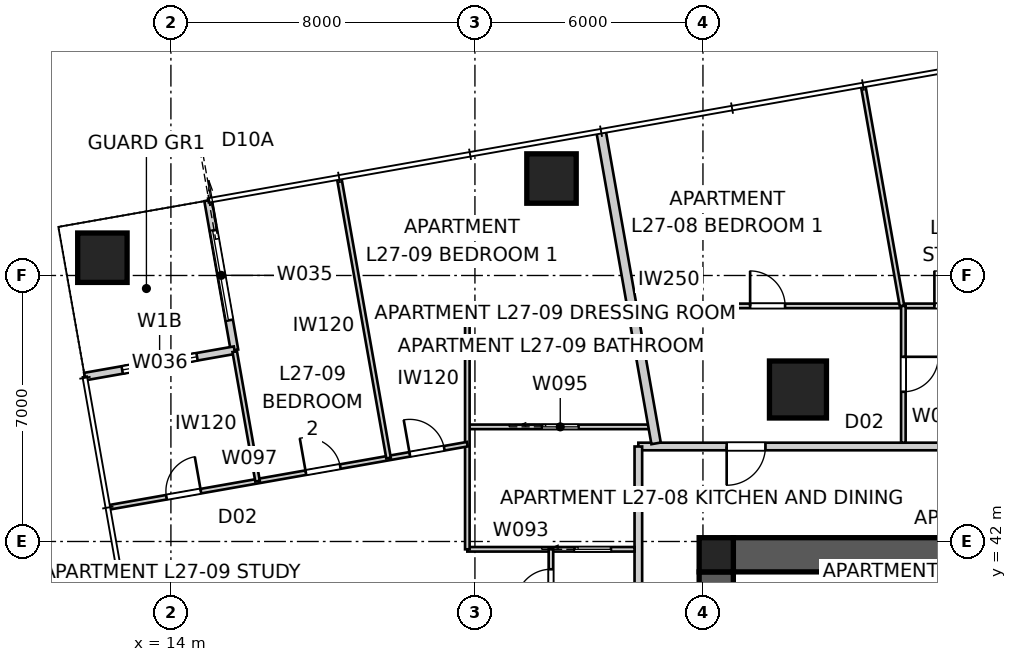
"""IFC4 building model, lengths in metres.
Left out: names, types, materials, properties, quantities, classifications, styles, units other than length and angle.
Written with IfcOpenShell. Run it as: python <this file> out.ifc"""

import sys

from ifc_helpers import new_model, si_unit, direction, frame, frame_2d, origin, origin_2d, place, context, subcontext, project, spatial, polyline, rectangle, outline, extrude, element, fill, save


model = new_model("IFC4")
c1 = context("Model", 3, precision=1e-05, world=origin(), true_north=direction((0.0, 1.0)))
c2 = subcontext(c1, "Body", "Model", "MODEL_VIEW")
j1 = project(units=[si_unit("LENGTHUNIT", "METRE"), si_unit("PLANEANGLEUNIT", "RADIAN")], contexts=[c1])
p1 = place(None, origin())
s1 = spatial("IfcSite", under=j1, at=p1, CompositionType="ELEMENT")
p2 = place(p1, origin())
s2 = spatial("IfcBuilding", under=s1, at=p2, CompositionType="ELEMENT")
p3 = place(p2, frame((0.0, 0.0, 99.8)))
s3 = spatial("IfcBuildingStorey", under=s2, at=p3, CompositionType="ELEMENT", Elevation=99.8)
p4 = place(p3, frame((28.8, 41.65, 0.0), z_axis=(0.0, 0.0, 1.0), x_axis=(1.0, 0.0, 0.0)))
e1 = element("IfcWall", 1, at=p4, inside=s3, PredefinedType="SHEAR", context=c2, shape_type="SweptSolid", body=[
    extrude(outline(polyline([(0.0, -0.45), (22.4, -0.45), (22.4, -0.025), (22.85, -0.025), (22.85, 0.025), (22.4, 0.025), (22.4, 0.45), (0.0, 0.45), (0.0, 0.025), (-0.45, 0.025), (-0.45, -0.025), (0.0, -0.025), (0.0, -0.45)])), origin(), (0.0, 0.0, 1.0), 3.4),
])
p5 = place(p3, frame((28.35, 41.2, 0.0), z_axis=(0.0, 0.0, 1.0), x_axis=(0.0, -1.0, 0.0)))
e2 = element("IfcWall", 2, at=p5, inside=s3, PredefinedType="SHEAR", context=c2, shape_type="SweptSolid", body=[
    extrude(outline(polyline([(0.0, -0.45), (22.4, -0.45), (22.4, -0.025), (22.85, -0.025), (22.85, 0.025), (22.4, 0.025), (22.4, 0.45), (0.0, 0.45), (0.0, 0.025), (-0.45, 0.025), (-0.45, -0.025), (0.0, -0.025), (0.0, -0.45)])), origin(), (0.0, 0.0, 1.0), 3.4),
])
p6 = place(p5, frame((11.14, 0.0, 0.0)))
e3 = element("IfcOpeningElement", 3, at=p6, cuts=e2, PredefinedType="OPENING", context=c2, shape_type="SweptSolid", body=[
    extrude(rectangle(XDim=1.02, YDim=2.4, at=frame_2d((0.51, 1.2))), frame((0.0, 0.46, 0.0), z_axis=(0.0, -1.0, 0.0), x_axis=(1.0, 0.0, 0.0)), (0.0, 0.0, 1.0), 0.92),
])
p7 = place(p3, frame((28.35, 41.65, 0.0), z_axis=(0.0, 0.0, 1.0), x_axis=(1.0, 0.0, 0.0)))
e4 = element("IfcColumn", 4, at=p7, inside=s3, PredefinedType="COLUMN", context=c2, shape_type="SweptSolid", body=[
    extrude(rectangle(XDim=0.9, YDim=0.9, at=origin_2d()), origin(), (0.0, 0.0, 1.0), 3.4),
])
for number, where, z_axis, x_axis in (
    (5, (24.015, 51.552, 0.0), (0.0, 0.0, 1.0), (1.0, 0.0, 0.0)),
    (6, (12.197, 49.468, 0.0), (0.0, 0.0, 1.0), (1.0, 0.0, 0.0)),
):
    element("IfcColumn", number, at=place(p3, frame(where, z_axis=z_axis, x_axis=x_axis)), inside=s3, PredefinedType="COLUMN", context=c2, shape_type="SweptSolid", body=[
        extrude(rectangle(XDim=1.3, YDim=1.3, at=origin_2d()), origin(), (0.0, 0.0, 1.0), 3.4),
    ])
p8 = place(p3, frame((30.5, 46.0, 0.0), z_axis=(0.0, 0.0, 1.0), x_axis=(1.0, 0.0, 0.0)))
e7 = element("IfcColumn", 7, at=p8, inside=s3, PredefinedType="COLUMN", context=c2, shape_type="SweptSolid", body=[
    extrude(rectangle(XDim=1.5, YDim=1.5, at=origin_2d()), origin(), (0.0, 0.0, 1.0), 3.4),
])
p9 = place(p3, frame((14.978, 50.974, 0.0), z_axis=(0.0, 0.0, 1.0), x_axis=(0.173646056486, -0.984808127031, 0.0)))
e8 = element("IfcWall", 8, at=p9, inside=s3, PredefinedType="SOLIDWALL", context=c2, shape_type="SweptSolid", body=[
    extrude(rectangle(XDim=4.0, YDim=0.2, at=frame_2d((2.0, 0.0))), origin(), (0.0, 0.0, 1.0), 3.25),
])
p10 = place(p9, frame((0.8, 0.0, 0.0)))
e9 = element("IfcOpeningElement", 9, at=p10, cuts=e8, PredefinedType="OPENING", context=c2, shape_type="SweptSolid", body=[
    extrude(rectangle(XDim=2.4, YDim=2.1, at=frame_2d((1.2, 1.05))), frame((0.0, 0.11, 0.0), z_axis=(0.0, -1.0, 0.0), x_axis=(1.0, 0.0, 0.0)), (0.0, 0.0, 1.0), 0.22),
])
p11 = place(p3, frame((15.672, 47.034, 0.0), z_axis=(0.0, 0.0, 1.0), x_axis=(-0.984808127031, -0.173646056486, 0.0)))
e10 = element("IfcWall", 10, at=p11, inside=s3, PredefinedType="SOLIDWALL", context=c2, shape_type="SweptSolid", body=[
    extrude(rectangle(XDim=4.0, YDim=0.2, at=frame_2d((2.0, 0.0))), origin(), (0.0, 0.0, 1.0), 3.25),
])
p12 = place(p11, frame((1.0, 0.0, 0.45)))
e11 = element("IfcOpeningElement", 11, at=p12, cuts=e10, PredefinedType="OPENING", context=c2, shape_type="SweptSolid", body=[
    extrude(rectangle(XDim=2.0, YDim=1.8, at=frame_2d((1.0, 0.9))), frame((0.0, 0.11, 0.0), z_axis=(0.0, -1.0, 0.0), x_axis=(1.0, 0.0, 0.0)), (0.0, 0.0, 1.0), 0.22),
])
p13 = place(p3, frame((53.7, 44.5, 0.0), z_axis=(0.0, 0.0, 1.0), x_axis=(-1.0, 0.0, 0.0)))
e12 = element("IfcWall", 12, at=p13, inside=s3, PredefinedType="PARTITIONING", context=c2, shape_type="SweptSolid", body=[
    extrude(rectangle(XDim=27.4, YDim=0.2, at=frame_2d((13.7, 0.0))), origin(), (0.0, 0.0, 1.0), 3.25),
])
p14 = place(p13, frame((24.056, 0.0, 0.0)))
e13 = element("IfcOpeningElement", 13, at=p14, cuts=e12, PredefinedType="OPENING", context=c2, shape_type="SweptSolid", body=[
    extrude(rectangle(XDim=1.02, YDim=2.1, at=frame_2d((0.51, 1.05))), frame((0.0, 0.11, 0.0), z_axis=(0.0, -1.0, 0.0), x_axis=(1.0, 0.0, 0.0)), (0.0, 0.0, 1.0), 0.22),
])
p15 = place(p13, frame((2.305, 0.0, 0.0)))
e14 = element("IfcOpeningElement", 14, at=p15, cuts=e12, PredefinedType="OPENING", context=c2, shape_type="SweptSolid", body=[
    extrude(rectangle(XDim=1.02, YDim=2.1, at=frame_2d((0.51, 1.05))), frame((0.0, 0.11, 0.0), z_axis=(0.0, -1.0, 0.0), x_axis=(1.0, 0.0, 0.0)), (0.0, 0.0, 1.0), 0.22),
])
p16 = place(p3, frame((26.3, 44.5, 0.0), z_axis=(0.0, 0.0, 1.0), x_axis=(0.0, -1.0, 0.0)))
e15 = element("IfcWall", 15, at=p16, inside=s3, PredefinedType="PARTITIONING", context=c2, shape_type="SweptSolid", body=[
    extrude(rectangle(XDim=29.0, YDim=0.2, at=frame_2d((14.5, 0.0))), origin(), (0.0, 0.0, 1.0), 3.25),
])
p17 = place(p16, frame((14.257, 0.0, 0.0)))
e16 = element("IfcOpeningElement", 16, at=p17, cuts=e15, PredefinedType="OPENING", context=c2, shape_type="SweptSolid", body=[
    extrude(rectangle(XDim=1.02, YDim=2.34, at=frame_2d((0.51, 1.17))), frame((0.0, 0.11, 0.0), z_axis=(0.0, -1.0, 0.0), x_axis=(1.0, 0.0, 0.0)), (0.0, 0.0, 1.0), 0.22),
])
p18 = place(p16, frame((18.322, 0.0, 0.0)))
e17 = element("IfcOpeningElement", 17, at=p18, cuts=e15, PredefinedType="OPENING", context=c2, shape_type="SweptSolid", body=[
    extrude(rectangle(XDim=1.02, YDim=2.34, at=frame_2d((0.51, 1.17))), frame((0.0, 0.11, 0.0), z_axis=(0.0, -1.0, 0.0), x_axis=(1.0, 0.0, 0.0)), (0.0, 0.0, 1.0), 0.22),
])
p19 = place(p16, frame((3.963, 0.0, 0.0)))
e18 = element("IfcOpeningElement", 18, at=p19, cuts=e15, PredefinedType="OPENING", context=c2, shape_type="SweptSolid", body=[
    extrude(rectangle(XDim=1.02, YDim=2.34, at=frame_2d((0.51, 1.17))), frame((0.0, 0.11, 0.0), z_axis=(0.0, -1.0, 0.0), x_axis=(1.0, 0.0, 0.0)), (0.0, 0.0, 1.0), 0.22),
])
p20 = place(p3, frame((25.318, 52.797, 0.0), z_axis=(0.0, 0.0, 1.0), x_axis=(0.173651756605, -0.984807121942, 0.0)))
e19 = element("IfcWall", 19, at=p20, inside=s3, PredefinedType="PARTITIONING", context=c2, shape_type="SweptSolid", body=[
    extrude(rectangle(XDim=8.341, YDim=0.25, at=frame_2d((4.171, 0.0))), origin(), (0.0, 0.0, 1.0), 3.25),
])
p21 = place(p3, frame((21.8, 48.2, 0.0), z_axis=(0.0, 0.0, 1.0), x_axis=(1.0, 0.0, 0.0)))
e20 = element("IfcWall", 20, at=p21, inside=s3, PredefinedType="PARTITIONING", context=c2, shape_type="SweptSolid", body=[
    extrude(rectangle(XDim=36.4, YDim=0.12, at=frame_2d((18.2, 0.0))), origin(), (0.0, 0.0, 1.0), 3.25),
])
p22 = place(p21, frame((7.441, 0.0, 0.0)))
e21 = element("IfcOpeningElement", 21, at=p22, cuts=e20, PredefinedType="OPENING", context=c2, shape_type="SweptSolid", body=[
    extrude(rectangle(XDim=0.92, YDim=2.34, at=frame_2d((0.46, 1.17))), frame((0.0, 0.07, 0.0), z_axis=(0.0, -1.0, 0.0), x_axis=(1.0, 0.0, 0.0)), (0.0, 0.0, 1.0), 0.14),
])
p23 = place(p21, frame((28.144, 0.0, 0.0)))
e22 = element("IfcOpeningElement", 22, at=p23, cuts=e20, PredefinedType="OPENING", context=c2, shape_type="SweptSolid", body=[
    extrude(rectangle(XDim=0.92, YDim=2.34, at=frame_2d((0.46, 1.17))), frame((0.0, 0.07, 0.0), z_axis=(0.0, -1.0, 0.0), x_axis=(1.0, 0.0, 0.0)), (0.0, 0.0, 1.0), 0.14),
])
p24 = place(p21, frame((12.29, 0.0, 0.0)))
e23 = element("IfcOpeningElement", 23, at=p24, cuts=e20, PredefinedType="OPENING", context=c2, shape_type="SweptSolid", body=[
    extrude(rectangle(XDim=0.92, YDim=2.34, at=frame_2d((0.46, 1.17))), frame((0.0, 0.07, 0.0), z_axis=(0.0, -1.0, 0.0), x_axis=(1.0, 0.0, 0.0)), (0.0, 0.0, 1.0), 0.14),
])
p25 = place(p21, frame((15.505, 0.0, 0.0)))
e24 = element("IfcOpeningElement", 24, at=p25, cuts=e20, PredefinedType="OPENING", context=c2, shape_type="SweptSolid", body=[
    extrude(rectangle(XDim=0.96, YDim=2.1, at=frame_2d((0.48, 1.05))), frame((0.0, 0.07, 0.0), z_axis=(0.0, -1.0, 0.0), x_axis=(1.0, 0.0, 0.0)), (0.0, 0.0, 1.0), 0.14),
])
p26 = place(p21, frame((18.991, 0.0, 0.0)))
e25 = element("IfcOpeningElement", 25, at=p26, cuts=e20, PredefinedType="OPENING", context=c2, shape_type="SweptSolid", body=[
    extrude(rectangle(XDim=0.96, YDim=2.1, at=frame_2d((0.48, 1.05))), frame((0.0, 0.07, 0.0), z_axis=(0.0, -1.0, 0.0), x_axis=(1.0, 0.0, 0.0)), (0.0, 0.0, 1.0), 0.14),
])
p27 = place(p3, frame((33.273, 48.2, 0.0), z_axis=(0.0, 0.0, 1.0), x_axis=(0.0, -1.0, 0.0)))
e26 = element("IfcWall", 26, at=p27, inside=s3, PredefinedType="PARTITIONING", context=c2, shape_type="SweptSolid", body=[
    extrude(rectangle(XDim=3.6, YDim=0.12, at=frame_2d((1.8, 0.0))), origin(), (0.0, 0.0, 1.0), 3.25),
])
p28 = place(p27, frame((1.34, 0.0, 0.0)))
e27 = element("IfcOpeningElement", 27, at=p28, cuts=e26, PredefinedType="OPENING", context=c2, shape_type="SweptSolid", body=[
    extrude(rectangle(XDim=0.92, YDim=2.34, at=frame_2d((0.46, 1.17))), frame((0.0, 0.07, 0.0), z_axis=(0.0, -1.0, 0.0), x_axis=(1.0, 0.0, 0.0)), (0.0, 0.0, 1.0), 0.14),
])
p29 = place(p3, frame((32.219, 53.973, 0.0), z_axis=(0.0, 0.0, 1.0), x_axis=(0.173623777139, -0.984812055172, 0.0)))
e28 = element("IfcWall", 28, at=p29, inside=s3, PredefinedType="PARTITIONING", context=c2, shape_type="SweptSolid", body=[
    extrude(rectangle(XDim=5.862, YDim=0.12, at=frame_2d((2.931, 0.0))), origin(), (0.0, 0.0, 1.0), 3.25),
])
p30 = place(p3, frame((21.8, 41.795, 0.0), z_axis=(0.0, 0.0, 1.0), x_axis=(1.0, 0.0, 0.0)))
e29 = element("IfcWall", 29, at=p30, inside=s3, PredefinedType="PARTITIONING", context=c2, shape_type="SweptSolid", body=[
    extrude(rectangle(XDim=4.4, YDim=0.12, at=frame_2d((2.2, 0.0))), origin(), (0.0, 0.0, 1.0), 3.25),
])
p31 = place(p30, frame((2.82, 0.0, 0.0)))
e30 = element("IfcOpeningElement", 30, at=p31, cuts=e29, PredefinedType="OPENING", context=c2, shape_type="SweptSolid", body=[
    extrude(rectangle(XDim=0.96, YDim=2.1, at=frame_2d((0.48, 1.05))), frame((0.0, 0.07, 0.0), z_axis=(0.0, -1.0, 0.0), x_axis=(1.0, 0.0, 0.0)), (0.0, 0.0, 1.0), 0.14),
])
p32 = place(p3, frame((24.0, 37.948, 0.0), z_axis=(0.0, 0.0, 1.0), x_axis=(0.0, 1.0, 0.0)))
e31 = element("IfcWall", 31, at=p32, inside=s3, PredefinedType="PARTITIONING", context=c2, shape_type="SweptSolid", body=[
    extrude(rectangle(XDim=3.847, YDim=0.12, at=frame_2d((1.923, 0.0))), origin(), (0.0, 0.0, 1.0), 2.55),
])
p33 = place(p32, frame((2.402, 0.0, 0.0)))
e32 = element("IfcOpeningElement", 32, at=p33, cuts=e31, PredefinedType="OPENING", context=c2, shape_type="SweptSolid", body=[
    extrude(rectangle(XDim=0.92, YDim=2.34, at=frame_2d((0.46, 1.17))), frame((0.0, 0.07, 0.0), z_axis=(0.0, -1.0, 0.0), x_axis=(1.0, 0.0, 0.0)), (0.0, 0.0, 1.0), 0.14),
])
p34 = place(p3, frame((21.8, 45.017, 0.0), z_axis=(0.0, 0.0, 1.0), x_axis=(1.0, 0.0, 0.0)))
e33 = element("IfcWall", 33, at=p34, inside=s3, PredefinedType="PARTITIONING", context=c2, shape_type="SweptSolid", body=[
    extrude(rectangle(XDim=4.89, YDim=0.12, at=frame_2d((2.445, 0.0))), origin(), (0.0, 0.0, 1.0), 3.25),
])
p35 = place(p34, frame((1.965, 0.0, 0.0)))
e34 = element("IfcOpeningElement", 34, at=p35, cuts=e33, PredefinedType="OPENING", context=c2, shape_type="SweptSolid", body=[
    extrude(rectangle(XDim=0.96, YDim=2.1, at=frame_2d((0.48, 1.05))), frame((0.0, 0.07, 0.0), z_axis=(0.0, -1.0, 0.0), x_axis=(1.0, 0.0, 0.0)), (0.0, 0.0, 1.0), 0.14),
])
p36 = place(p3, frame((21.8, 41.795, 0.0), z_axis=(0.0, 0.0, 1.0), x_axis=(0.0, 1.0, 0.0)))
e35 = element("IfcWall", 35, at=p36, inside=s3, PredefinedType="PARTITIONING", context=c2, shape_type="SweptSolid", body=[
    extrude(rectangle(XDim=6.405, YDim=0.12, at=frame_2d((3.203, 0.0))), origin(), (0.0, 0.0, 1.0), 3.25),
])
p37 = place(p3, frame((12.38, 42.9, 0.0), z_axis=(0.0, 0.0, 1.0), x_axis=(0.984808730291, 0.173642635155, 0.0)))
e36 = element("IfcWall", 36, at=p37, inside=s3, PredefinedType="PARTITIONING", context=c2, shape_type="SweptSolid", body=[
    extrude(rectangle(XDim=9.565, YDim=0.12, at=frame_2d((4.782, 0.0))), origin(), (0.0, 0.0, 1.0), 3.25),
])
p38 = place(p37, frame((1.525, 0.0, 0.0)))
e37 = element("IfcOpeningElement", 37, at=p38, cuts=e36, PredefinedType="OPENING", context=c2, shape_type="SweptSolid", body=[
    extrude(rectangle(XDim=0.92, YDim=2.34, at=frame_2d((0.46, 1.17))), frame((0.0, 0.07, 0.0), z_axis=(0.0, -1.0, 0.0), x_axis=(1.0, 0.0, 0.0)), (0.0, 0.0, 1.0), 0.14),
])
p39 = place(p37, frame((5.25, 0.0, 0.0)))
e38 = element("IfcOpeningElement", 38, at=p39, cuts=e36, PredefinedType="OPENING", context=c2, shape_type="SweptSolid", body=[
    extrude(rectangle(XDim=0.92, YDim=2.34, at=frame_2d((0.46, 1.17))), frame((0.0, 0.07, 0.0), z_axis=(0.0, -1.0, 0.0), x_axis=(1.0, 0.0, 0.0)), (0.0, 0.0, 1.0), 0.14),
])
p40 = place(p37, frame((8.028, 0.0, 0.0)))
e39 = element("IfcOpeningElement", 39, at=p40, cuts=e36, PredefinedType="OPENING", context=c2, shape_type="SweptSolid", body=[
    extrude(rectangle(XDim=0.92, YDim=2.34, at=frame_2d((0.46, 1.17))), frame((0.0, 0.07, 0.0), z_axis=(0.0, -1.0, 0.0), x_axis=(1.0, 0.0, 0.0)), (0.0, 0.0, 1.0), 0.14),
])
p41 = place(p3, frame((19.727, 44.195, 0.0), z_axis=(0.0, 0.0, 1.0), x_axis=(-0.173647177755, 0.984807929323, 0.0)))
e40 = element("IfcWall", 40, at=p41, inside=s3, PredefinedType="PARTITIONING", context=c2, shape_type="SweptSolid", body=[
    extrude(rectangle(XDim=7.46, YDim=0.12, at=frame_2d((3.73, 0.0))), origin(), (0.0, 0.0, 1.0), 3.25),
])
p42 = place(p3, frame((16.28, 43.588, 0.0), z_axis=(0.0, 0.0, 1.0), x_axis=(-0.173660541335, 0.984805572884, 0.0)))
e41 = element("IfcWall", 41, at=p42, inside=s3, PredefinedType="PARTITIONING", context=c2, shape_type="SweptSolid", body=[
    extrude(rectangle(XDim=3.46, YDim=0.12, at=frame_2d((1.73, 0.0))), origin(), (0.0, 0.0, 1.0), 3.25),
])
p43 = place(p10, origin())
e42 = element("IfcDoor", 42, at=p43, inside=s3, OperationType="SLIDING_TO_LEFT", PredefinedType="DOOR", context=c2, shape_type="SweptSolid", body=[
    extrude(rectangle(XDim=2.4, YDim=2.1, at=frame_2d((1.2, 1.05))), frame((0.0, 0.025, 0.0), z_axis=(0.0, -1.0, 0.0), x_axis=(1.0, 0.0, 0.0)), (0.0, 0.0, 1.0), 0.05),
])
fill(e9, e42)
p44 = place(p12, origin())
e43 = element("IfcWindow", 43, at=p44, inside=s3, PartitioningType="SINGLE_PANEL", PredefinedType="WINDOW", context=c2, shape_type="SweptSolid", body=[
    extrude(rectangle(XDim=2.0, YDim=1.8, at=frame_2d((1.0, 0.9))), frame((0.0, 0.03, 0.0), z_axis=(0.0, -1.0, 0.0), x_axis=(1.0, 0.0, 0.0)), (0.0, 0.0, 1.0), 0.06),
])
fill(e11, e43)
p45 = place(p14, origin())
e44 = element("IfcDoor", 44, at=p45, inside=s3, OperationType="SINGLE_SWING_RIGHT", PredefinedType="DOOR", context=c2, shape_type="SweptSolid", body=[
    extrude(rectangle(XDim=1.02, YDim=2.1, at=frame_2d((0.51, 1.05))), frame((0.0, 0.025, 0.0), z_axis=(0.0, -1.0, 0.0), x_axis=(1.0, 0.0, 0.0)), (0.0, 0.0, 1.0), 0.05),
])
fill(e13, e44)
p46 = place(p22, origin())
e45 = element("IfcDoor", 45, at=p46, inside=s3, OperationType="SINGLE_SWING_LEFT", PredefinedType="DOOR", context=c2, shape_type="SweptSolid", body=[
    extrude(rectangle(XDim=0.92, YDim=2.34, at=frame_2d((0.46, 1.17))), frame((0.0, 0.025, 0.0), z_axis=(0.0, -1.0, 0.0), x_axis=(1.0, 0.0, 0.0)), (0.0, 0.0, 1.0), 0.05),
])
fill(e21, e45)
p47 = place(p28, origin())
e46 = element("IfcDoor", 46, at=p47, inside=s3, OperationType="SINGLE_SWING_LEFT", PredefinedType="DOOR", context=c2, shape_type="SweptSolid", body=[
    extrude(rectangle(XDim=0.92, YDim=2.34, at=frame_2d((0.46, 1.17))), frame((0.0, 0.025, 0.0), z_axis=(0.0, -1.0, 0.0), x_axis=(1.0, 0.0, 0.0)), (0.0, 0.0, 1.0), 0.05),
])
fill(e27, e46)
p48 = place(p33, origin())
e47 = element("IfcDoor", 47, at=p48, inside=s3, OperationType="SINGLE_SWING_LEFT", PredefinedType="DOOR", context=c2, shape_type="SweptSolid", body=[
    extrude(rectangle(XDim=0.92, YDim=2.34, at=frame_2d((0.46, 1.17))), frame((0.0, 0.025, 0.0), z_axis=(0.0, -1.0, 0.0), x_axis=(1.0, 0.0, 0.0)), (0.0, 0.0, 1.0), 0.05),
])
fill(e32, e47)
p49 = place(p31, origin())
e48 = element("IfcDoor", 48, at=p49, inside=s3, OperationType="SLIDING_TO_LEFT", PredefinedType="DOOR", context=c2, shape_type="SweptSolid", body=[
    extrude(rectangle(XDim=0.96, YDim=2.1, at=frame_2d((0.48, 1.05))), frame((0.0, 0.025, 0.0), z_axis=(0.0, -1.0, 0.0), x_axis=(1.0, 0.0, 0.0)), (0.0, 0.0, 1.0), 0.05),
])
fill(e30, e48)
p50 = place(p24, origin())
e49 = element("IfcDoor", 49, at=p50, inside=s3, OperationType="SINGLE_SWING_LEFT", PredefinedType="DOOR", context=c2, shape_type="SweptSolid", body=[
    extrude(rectangle(XDim=0.92, YDim=2.34, at=frame_2d((0.46, 1.17))), frame((0.0, 0.025, 0.0), z_axis=(0.0, -1.0, 0.0), x_axis=(1.0, 0.0, 0.0)), (0.0, 0.0, 1.0), 0.05),
])
fill(e23, e49)
p51 = place(p38, origin())
e50 = element("IfcDoor", 50, at=p51, inside=s3, OperationType="SINGLE_SWING_RIGHT", PredefinedType="DOOR", context=c2, shape_type="SweptSolid", body=[
    extrude(rectangle(XDim=0.92, YDim=2.34, at=frame_2d((0.46, 1.17))), frame((0.0, 0.025, 0.0), z_axis=(0.0, -1.0, 0.0), x_axis=(1.0, 0.0, 0.0)), (0.0, 0.0, 1.0), 0.05),
])
fill(e37, e50)
p52 = place(p39, origin())
e51 = element("IfcDoor", 51, at=p52, inside=s3, OperationType="SINGLE_SWING_LEFT", PredefinedType="DOOR", context=c2, shape_type="SweptSolid", body=[
    extrude(rectangle(XDim=0.92, YDim=2.34, at=frame_2d((0.46, 1.17))), frame((0.0, 0.025, 0.0), z_axis=(0.0, -1.0, 0.0), x_axis=(1.0, 0.0, 0.0)), (0.0, 0.0, 1.0), 0.05),
])
fill(e38, e51)
p53 = place(p40, origin())
e52 = element("IfcDoor", 52, at=p53, inside=s3, OperationType="SINGLE_SWING_LEFT", PredefinedType="DOOR", context=c2, shape_type="SweptSolid", body=[
    extrude(rectangle(XDim=0.92, YDim=2.34, at=frame_2d((0.46, 1.17))), frame((0.0, 0.025, 0.0), z_axis=(0.0, -1.0, 0.0), x_axis=(1.0, 0.0, 0.0)), (0.0, 0.0, 1.0), 0.05),
])
fill(e39, e52)
p54 = place(p35, origin())
e53 = element("IfcDoor", 53, at=p54, inside=s3, OperationType="SLIDING_TO_LEFT", PredefinedType="DOOR", context=c2, shape_type="SweptSolid", body=[
    extrude(rectangle(XDim=0.96, YDim=2.1, at=frame_2d((0.48, 1.05))), frame((0.0, 0.025, 0.0), z_axis=(0.0, -1.0, 0.0), x_axis=(1.0, 0.0, 0.0)), (0.0, 0.0, 1.0), 0.05),
])
fill(e34, e53)
save(model, sys.argv[1])
